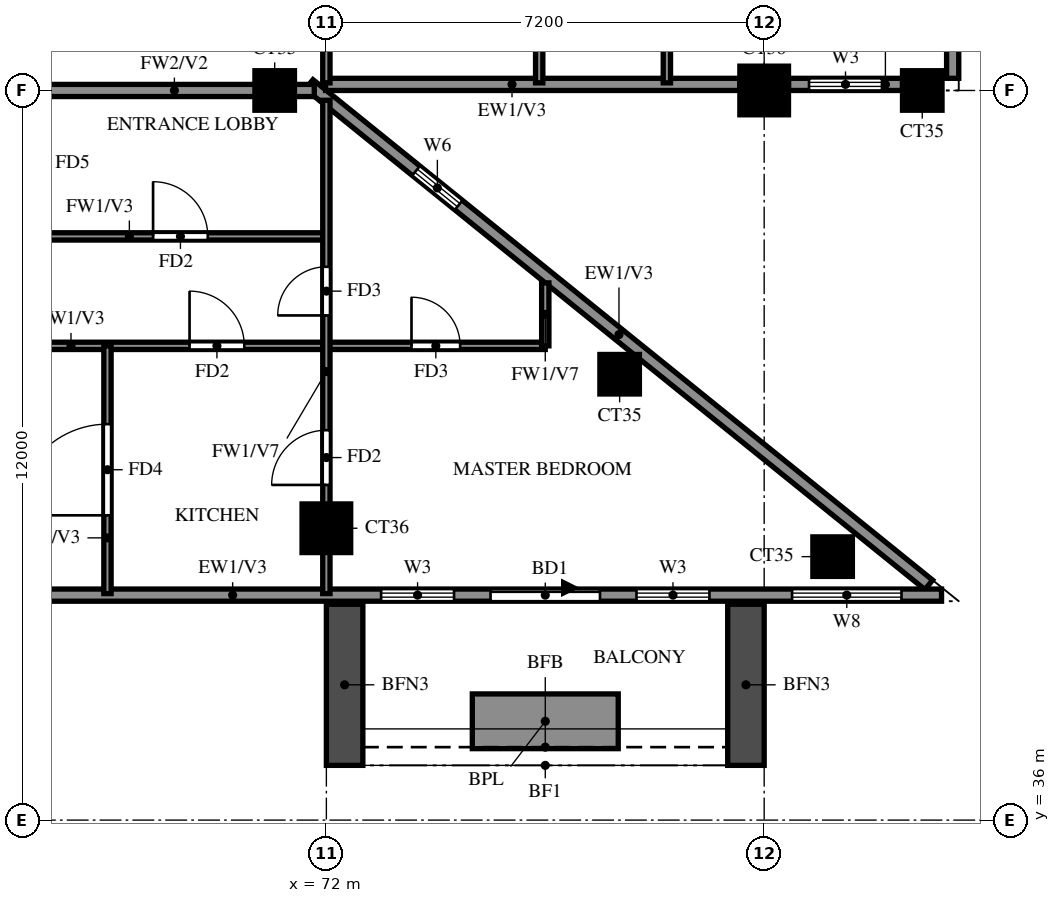
"""IFC4 building model, lengths in metres.
Left out: names, types, materials, properties, quantities, classifications, styles, units other than length and angle.
Written with IfcOpenShell. Run it as: python <this file> out.ifc"""

import sys

from ifc_helpers import new_model, si_unit, direction, frame, frame_2d, origin, origin_2d, place, context, subcontext, project, spatial, rectangle, extrude, source, transform, mapped, element, fill, save


model = new_model("IFC4")
c1 = context("Model", 3, precision=1e-05, world=origin(), true_north=direction((0.0, 1.0)))
c2 = subcontext(c1, "Body", "Model", "MODEL_VIEW")
j1 = project(units=[si_unit("LENGTHUNIT", "METRE"), si_unit("PLANEANGLEUNIT", "RADIAN")], contexts=[c1])
p1 = place(None, origin())
s1 = spatial("IfcSite", under=j1, at=p1, CompositionType="ELEMENT")
p2 = place(p1, origin())
s2 = spatial("IfcBuilding", under=s1, at=p2, CompositionType="ELEMENT")
p3 = place(p2, frame((0.0, 0.0, 243.0)))
s3 = spatial("IfcBuildingStorey", under=s2, at=p3, CompositionType="ELEMENT", Elevation=243.0)
m1 = source(origin(), c2, "Body", "SweptSolid", [
    extrude(rectangle(XDim=0.65, YDim=0.65, at=origin_2d()), origin(), (0.0, 0.0, 1.0), 3.22),
])
p4 = place(p3, frame((80.326, 40.333, 0.0), z_axis=(0.0, 0.0, 1.0), x_axis=(1.0, 0.0, 0.0)))
e1 = element("IfcColumn", 1, at=p4, inside=s3, PredefinedType="COLUMN", context=c2, shape_type="MappedRepresentation", body=[
    mapped(m1, transform((0.0, 0.0, 0.0))),
])
m2 = source(origin(), c2, "Body", "SweptSolid", [
    extrude(rectangle(XDim=0.8, YDim=0.8, at=origin_2d()), origin(), (0.0, 0.0, 1.0), 3.22),
])
p5 = place(p3, frame((72.0, 40.8, 0.0), z_axis=(0.0, 0.0, 1.0), x_axis=(1.0, 0.0, 0.0)))
e2 = element("IfcColumn", 2, at=p5, inside=s3, PredefinedType="COLUMN", context=c2, shape_type="MappedRepresentation", body=[
    mapped(m2, transform((0.0, 0.0, 0.0))),
])
for number, where, z_axis, x_axis in (
    (3, (76.823, 43.333, 0.0), (0.0, 0.0, 1.0), (1.0, 0.0, 0.0)),
    (4, (71.15, 48.0, 0.0), (0.0, 0.0, 1.0), (1.0, 0.0, 0.0)),
):
    element("IfcColumn", number, at=place(p3, frame(where, z_axis=z_axis, x_axis=x_axis)), inside=s3, PredefinedType="COLUMN", context=c2, shape_type="MappedRepresentation", body=[
        mapped(m1, transform((0.0, 0.0, 0.0))),
    ])
p6 = place(p3, frame((79.2, 48.0, 0.0), z_axis=(0.0, 0.0, 1.0), x_axis=(1.0, 0.0, 0.0)))
e5 = element("IfcColumn", 5, at=p6, inside=s3, PredefinedType="COLUMN", context=c2, shape_type="MappedRepresentation", body=[
    mapped(m2, transform((0.0, 0.0, 0.0))),
])
p7 = place(p3, frame((81.8, 48.0, 0.0), z_axis=(0.0, 0.0, 1.0), x_axis=(1.0, 0.0, 0.0)))
e6 = element("IfcColumn", 6, at=p7, inside=s3, PredefinedType="COLUMN", context=c2, shape_type="MappedRepresentation", body=[
    mapped(m1, transform((0.0, 0.0, 0.0))),
])
p8 = place(p3, frame((81.907, 39.87, 0.0), z_axis=(0.0, 0.0, 1.0), x_axis=(-0.777936274417, 0.62834318087, 0.0)))
e7 = element("IfcWall", 7, at=p8, inside=s3, PredefinedType="SOLIDWALL", context=c2, shape_type="SweptSolid", body=[
    extrude(rectangle(XDim=13.099, YDim=0.2, at=frame_2d((6.549, 0.0))), origin(), (0.0, 0.0, 1.0), 3.22),
])
p9 = place(p8, frame((9.938, 0.0, 1.5)))
e8 = element("IfcOpeningElement", 8, at=p9, cuts=e7, PredefinedType="OPENING", context=c2, shape_type="SweptSolid", body=[
    extrude(rectangle(XDim=0.9, YDim=0.9, at=frame_2d((0.45, 0.45))), frame((0.0, 0.11, 0.0), z_axis=(0.0, -1.0, 0.0), x_axis=(1.0, 0.0, 0.0)), (0.0, 0.0, 1.0), 0.22),
])
p10 = place(p3, frame((71.987, 48.1, 0.0), z_axis=(0.0, 0.0, 1.0), x_axis=(1.0, 0.0, 0.0)))
e9 = element("IfcWall", 9, at=p10, inside=s3, PredefinedType="SOLIDWALL", context=c2, shape_type="SweptSolid", body=[
    extrude(rectangle(XDim=6.813, YDim=0.2, at=frame_2d((3.406, 0.0))), origin(), (0.0, 0.0, 1.0), 3.22),
])
p11 = place(p3, frame((79.6, 48.1, 0.0), z_axis=(0.0, 0.0, 1.0), x_axis=(1.0, 0.0, 0.0)))
e10 = element("IfcWall", 10, at=p11, inside=s3, PredefinedType="SOLIDWALL", context=c2, shape_type="SweptSolid", body=[
    extrude(rectangle(XDim=1.875, YDim=0.2, at=frame_2d((0.938, 0.0))), origin(), (0.0, 0.0, 1.0), 3.22),
])
p12 = place(p11, frame((0.337, 0.0, 0.6)))
e11 = element("IfcOpeningElement", 11, at=p12, cuts=e10, PredefinedType="OPENING", context=c2, shape_type="SweptSolid", body=[
    extrude(rectangle(XDim=1.2, YDim=2.4, at=frame_2d((0.6, 1.2))), frame((0.0, 0.11, 0.0), z_axis=(0.0, -1.0, 0.0), x_axis=(1.0, 0.0, 0.0)), (0.0, 0.0, 1.0), 0.22),
])
p13 = place(p3, frame((82.3, 48.2, 0.0), z_axis=(0.0, 0.0, 1.0), x_axis=(0.0, 1.0, 0.0)))
e12 = element("IfcWall", 12, at=p13, inside=s3, PredefinedType="SOLIDWALL", context=c2, shape_type="SweptSolid", body=[
    extrude(rectangle(XDim=28.6, YDim=0.2, at=frame_2d((14.3, 0.0))), origin(), (0.0, 0.0, 1.0), 3.22),
])
p14 = place(p13, frame((11.5, 0.0, 0.0)))
e13 = element("IfcOpeningElement", 13, at=p14, cuts=e12, PredefinedType="OPENING", context=c2, shape_type="SweptSolid", body=[
    extrude(rectangle(XDim=1.8, YDim=2.4, at=frame_2d((0.9, 1.2))), frame((0.0, 0.11, 0.0), z_axis=(0.0, -1.0, 0.0), x_axis=(1.0, 0.0, 0.0)), (0.0, 0.0, 1.0), 0.22),
])
p15 = place(p13, frame((0.9, 0.0, 0.6)))
e14 = element("IfcOpeningElement", 14, at=p15, cuts=e12, PredefinedType="OPENING", context=c2, shape_type="SweptSolid", body=[
    extrude(rectangle(XDim=2.4, YDim=2.4, at=frame_2d((1.2, 1.2))), frame((0.0, 0.11, 0.0), z_axis=(0.0, -1.0, 0.0), x_axis=(1.0, 0.0, 0.0)), (0.0, 0.0, 1.0), 0.22),
])
p16 = place(p13, frame((3.9, 0.0, 0.6)))
e15 = element("IfcOpeningElement", 15, at=p16, cuts=e12, PredefinedType="OPENING", context=c2, shape_type="SweptSolid", body=[
    extrude(rectangle(XDim=2.4, YDim=2.4, at=frame_2d((1.2, 1.2))), frame((0.0, 0.11, 0.0), z_axis=(0.0, -1.0, 0.0), x_axis=(1.0, 0.0, 0.0)), (0.0, 0.0, 1.0), 0.22),
])
p17 = place(p13, frame((7.3, 0.0, 0.6)))
e16 = element("IfcOpeningElement", 16, at=p17, cuts=e12, PredefinedType="OPENING", context=c2, shape_type="SweptSolid", body=[
    extrude(rectangle(XDim=1.8, YDim=2.4, at=frame_2d((0.9, 1.2))), frame((0.0, 0.11, 0.0), z_axis=(0.0, -1.0, 0.0), x_axis=(1.0, 0.0, 0.0)), (0.0, 0.0, 1.0), 0.22),
])
p18 = place(p13, frame((14.5, 0.0, 0.6)))
e17 = element("IfcOpeningElement", 17, at=p18, cuts=e12, PredefinedType="OPENING", context=c2, shape_type="SweptSolid", body=[
    extrude(rectangle(XDim=1.2, YDim=2.4, at=frame_2d((0.6, 1.2))), frame((0.0, 0.11, 0.0), z_axis=(0.0, -1.0, 0.0), x_axis=(1.0, 0.0, 0.0)), (0.0, 0.0, 1.0), 0.22),
])
p19 = place(p13, frame((17.8, 0.0, 0.6)))
e18 = element("IfcOpeningElement", 18, at=p19, cuts=e12, PredefinedType="OPENING", context=c2, shape_type="SweptSolid", body=[
    extrude(rectangle(XDim=2.4, YDim=2.4, at=frame_2d((1.2, 1.2))), frame((0.0, 0.11, 0.0), z_axis=(0.0, -1.0, 0.0), x_axis=(1.0, 0.0, 0.0)), (0.0, 0.0, 1.0), 0.22),
])
p20 = place(p13, frame((22.75, 0.0, 1.5)))
e19 = element("IfcOpeningElement", 19, at=p20, cuts=e12, PredefinedType="OPENING", context=c2, shape_type="SweptSolid", body=[
    extrude(rectangle(XDim=0.9, YDim=0.9, at=frame_2d((0.45, 0.45))), frame((0.0, 0.11, 0.0), z_axis=(0.0, -1.0, 0.0), x_axis=(1.0, 0.0, 0.0)), (0.0, 0.0, 1.0), 0.22),
])
p21 = place(p13, frame((25.5, 0.0, 0.6)))
e20 = element("IfcOpeningElement", 20, at=p21, cuts=e12, PredefinedType="OPENING", context=c2, shape_type="SweptSolid", body=[
    extrude(rectangle(XDim=2.4, YDim=2.4, at=frame_2d((1.2, 1.2))), frame((0.0, 0.11, 0.0), z_axis=(0.0, -1.0, 0.0), x_axis=(1.0, 0.0, 0.0)), (0.0, 0.0, 1.0), 0.22),
])
p22 = place(p3, frame((58.8, 39.7, 0.0), z_axis=(0.0, 0.0, 1.0), x_axis=(1.0, 0.0, 0.0)))
e21 = element("IfcWall", 21, at=p22, inside=s3, PredefinedType="SOLIDWALL", context=c2, shape_type="SweptSolid", body=[
    extrude(rectangle(XDim=23.317, YDim=0.2, at=frame_2d((11.658, 0.0))), origin(), (0.0, 0.0, 1.0), 3.22),
])
p23 = place(p22, frame((15.9, 0.0, 0.0)))
e22 = element("IfcOpeningElement", 22, at=p23, cuts=e21, PredefinedType="OPENING", context=c2, shape_type="SweptSolid", body=[
    extrude(rectangle(XDim=1.8, YDim=2.4, at=frame_2d((0.9, 1.2))), frame((0.0, 0.11, 0.0), z_axis=(0.0, -1.0, 0.0), x_axis=(1.0, 0.0, 0.0)), (0.0, 0.0, 1.0), 0.22),
])
p24 = place(p22, frame((2.433, 0.0, 0.6)))
e23 = element("IfcOpeningElement", 23, at=p24, cuts=e21, PredefinedType="OPENING", context=c2, shape_type="SweptSolid", body=[
    extrude(rectangle(XDim=2.4, YDim=2.4, at=frame_2d((1.2, 1.2))), frame((0.0, 0.11, 0.0), z_axis=(0.0, -1.0, 0.0), x_axis=(1.0, 0.0, 0.0)), (0.0, 0.0, 1.0), 0.22),
])
p25 = place(p22, frame((5.967, 0.0, 0.6)))
e24 = element("IfcOpeningElement", 24, at=p25, cuts=e21, PredefinedType="OPENING", context=c2, shape_type="SweptSolid", body=[
    extrude(rectangle(XDim=2.4, YDim=2.4, at=frame_2d((1.2, 1.2))), frame((0.0, 0.11, 0.0), z_axis=(0.0, -1.0, 0.0), x_axis=(1.0, 0.0, 0.0)), (0.0, 0.0, 1.0), 0.22),
])
p26 = place(p22, frame((14.1, 0.0, 0.6)))
e25 = element("IfcOpeningElement", 25, at=p26, cuts=e21, PredefinedType="OPENING", context=c2, shape_type="SweptSolid", body=[
    extrude(rectangle(XDim=1.2, YDim=2.4, at=frame_2d((0.6, 1.2))), frame((0.0, 0.11, 0.0), z_axis=(0.0, -1.0, 0.0), x_axis=(1.0, 0.0, 0.0)), (0.0, 0.0, 1.0), 0.22),
])
p27 = place(p22, frame((18.3, 0.0, 0.6)))
e26 = element("IfcOpeningElement", 26, at=p27, cuts=e21, PredefinedType="OPENING", context=c2, shape_type="SweptSolid", body=[
    extrude(rectangle(XDim=1.2, YDim=2.4, at=frame_2d((0.6, 1.2))), frame((0.0, 0.11, 0.0), z_axis=(0.0, -1.0, 0.0), x_axis=(1.0, 0.0, 0.0)), (0.0, 0.0, 1.0), 0.22),
])
p28 = place(p22, frame((20.858, 0.0, 0.6)))
e27 = element("IfcOpeningElement", 27, at=p28, cuts=e21, PredefinedType="OPENING", context=c2, shape_type="SweptSolid", body=[
    extrude(rectangle(XDim=1.8, YDim=2.4, at=frame_2d((0.9, 1.2))), frame((0.0, 0.11, 0.0), z_axis=(0.0, -1.0, 0.0), x_axis=(1.0, 0.0, 0.0)), (0.0, 0.0, 1.0), 0.22),
])
for number, where, z_axis, x_axis in (
    (28, (72.3, 39.55, 0.0), (0.0, 0.0, 1.0), (0.0, -1.0, 0.0)),
    (29, (78.9, 39.55, 0.0), (0.0, 0.0, 1.0), (0.0, -1.0, 0.0)),
):
    element("IfcWall", number, at=place(p3, frame(where, z_axis=z_axis, x_axis=x_axis)), inside=s3, PredefinedType="SOLIDWALL", context=c2, shape_type="SweptSolid", body=[
        extrude(rectangle(XDim=2.65, YDim=0.6, at=frame_2d((1.325, 0.0))), origin(), (0.0, 0.0, 1.0), 2.85),
    ])
p29 = place(p3, frame((74.4, 37.625, 0.0), z_axis=(0.0, 0.0, 1.0), x_axis=(1.0, 0.0, 0.0)))
e30 = element("IfcWall", 30, at=p29, inside=s3, PredefinedType="SOLIDWALL", context=c2, shape_type="SweptSolid", body=[
    extrude(rectangle(XDim=2.4, YDim=0.9, at=frame_2d((1.2, 0.0))), origin(), (0.0, 0.0, 1.0), 0.9),
])
p30 = place(p3, frame((67.2, 48.0, 0.0), z_axis=(0.0, 0.0, 1.0), x_axis=(1.0, 0.0, 0.0)))
e31 = element("IfcWall", 31, at=p30, inside=s3, PredefinedType="SOLIDWALL", context=c2, shape_type="SweptSolid", body=[
    extrude(rectangle(XDim=4.601, YDim=0.2, at=frame_2d((2.301, 0.0))), origin(), (0.0, 0.0, 1.0), 3.22),
])
p31 = place(p3, frame((60.0, 43.8, 0.0), z_axis=(0.0, 0.0, 1.0), x_axis=(1.0, 0.0, 0.0)))
e32 = element("IfcWall", 32, at=p31, inside=s3, PredefinedType="PARTITIONING", context=c2, shape_type="SweptSolid", body=[
    extrude(rectangle(XDim=15.6, YDim=0.12, at=frame_2d((7.8, 0.0))), origin(), (0.0, 0.0, 1.0), 3.22),
])
p32 = place(p31, frame((9.75, 0.0, 0.0)))
e33 = element("IfcOpeningElement", 33, at=p32, cuts=e32, PredefinedType="OPENING", context=c2, shape_type="SweptSolid", body=[
    extrude(rectangle(XDim=0.9, YDim=2.1, at=frame_2d((0.45, 1.05))), frame((0.0, 0.07, 0.0), z_axis=(0.0, -1.0, 0.0), x_axis=(1.0, 0.0, 0.0)), (0.0, 0.0, 1.0), 0.14),
])
p33 = place(p31, frame((3.45, 0.0, 0.0)))
e34 = element("IfcOpeningElement", 34, at=p33, cuts=e32, PredefinedType="OPENING", context=c2, shape_type="SweptSolid", body=[
    extrude(rectangle(XDim=1.5, YDim=2.1, at=frame_2d((0.75, 1.05))), frame((0.0, 0.07, 0.0), z_axis=(0.0, -1.0, 0.0), x_axis=(1.0, 0.0, 0.0)), (0.0, 0.0, 1.0), 0.14),
])
p34 = place(p31, frame((13.4, 0.0, 0.0)))
e35 = element("IfcOpeningElement", 35, at=p34, cuts=e32, PredefinedType="OPENING", context=c2, shape_type="SweptSolid", body=[
    extrude(rectangle(XDim=0.8, YDim=2.1, at=frame_2d((0.4, 1.05))), frame((0.0, 0.07, 0.0), z_axis=(0.0, -1.0, 0.0), x_axis=(1.0, 0.0, 0.0)), (0.0, 0.0, 1.0), 0.14),
])
p35 = place(p3, frame((67.2, 45.6, 0.0), z_axis=(0.0, 0.0, 1.0), x_axis=(1.0, 0.0, 0.0)))
e36 = element("IfcWall", 36, at=p35, inside=s3, PredefinedType="PARTITIONING", context=c2, shape_type="SweptSolid", body=[
    extrude(rectangle(XDim=4.8, YDim=0.12, at=frame_2d((2.4, 0.0))), origin(), (0.0, 0.0, 1.0), 3.22),
])
p36 = place(p35, frame((1.95, 0.0, 0.0)))
e37 = element("IfcOpeningElement", 37, at=p36, cuts=e36, PredefinedType="OPENING", context=c2, shape_type="SweptSolid", body=[
    extrude(rectangle(XDim=0.9, YDim=2.1, at=frame_2d((0.45, 1.05))), frame((0.0, 0.07, 0.0), z_axis=(0.0, -1.0, 0.0), x_axis=(1.0, 0.0, 0.0)), (0.0, 0.0, 1.0), 0.14),
])
p37 = place(p3, frame((68.4, 39.725, 0.0), z_axis=(0.0, 0.0, 1.0), x_axis=(0.0, 1.0, 0.0)))
e38 = element("IfcWall", 38, at=p37, inside=s3, PredefinedType="PARTITIONING", context=c2, shape_type="SweptSolid", body=[
    extrude(rectangle(XDim=4.075, YDim=0.12, at=frame_2d((2.038, 0.0))), origin(), (0.0, 0.0, 1.0), 3.22),
])
p38 = place(p37, frame((1.288, 0.0, 0.0)))
e39 = element("IfcOpeningElement", 39, at=p38, cuts=e38, PredefinedType="OPENING", context=c2, shape_type="SweptSolid", body=[
    extrude(rectangle(XDim=1.5, YDim=2.1, at=frame_2d((0.75, 1.05))), frame((0.0, 0.07, 0.0), z_axis=(0.0, -1.0, 0.0), x_axis=(1.0, 0.0, 0.0)), (0.0, 0.0, 1.0), 0.14),
])
p39 = place(p3, frame((72.0, 39.725, 0.0), z_axis=(0.0, 0.0, 1.0), x_axis=(0.0, 1.0, 0.0)))
e40 = element("IfcWall", 40, at=p39, inside=s3, PredefinedType="PARTITIONING", context=c2, shape_type="SweptSolid", body=[
    extrude(rectangle(XDim=8.114, YDim=0.12, at=frame_2d((4.057, 0.0))), origin(), (0.0, 0.0, 1.0), 2.32),
])
p40 = place(p39, frame((1.788, 0.0, 0.0)))
e41 = element("IfcOpeningElement", 41, at=p40, cuts=e40, PredefinedType="OPENING", context=c2, shape_type="SweptSolid", body=[
    extrude(rectangle(XDim=0.9, YDim=2.1, at=frame_2d((0.45, 1.05))), frame((0.0, 0.07, 0.0), z_axis=(0.0, -1.0, 0.0), x_axis=(1.0, 0.0, 0.0)), (0.0, 0.0, 1.0), 0.14),
])
p41 = place(p39, frame((4.575, 0.0, 0.0)))
e42 = element("IfcOpeningElement", 42, at=p41, cuts=e40, PredefinedType="OPENING", context=c2, shape_type="SweptSolid", body=[
    extrude(rectangle(XDim=0.8, YDim=2.1, at=frame_2d((0.4, 1.05))), frame((0.0, 0.07, 0.0), z_axis=(0.0, -1.0, 0.0), x_axis=(1.0, 0.0, 0.0)), (0.0, 0.0, 1.0), 0.14),
])
for number, where, z_axis, x_axis in (
    (43, (72.0, 48.125, 0.0), (0.0, 0.0, 1.0), (0.0, 1.0, 0.0)),
    (44, (75.5, 48.125, 0.0), (0.0, 0.0, 1.0), (0.0, 1.0, 0.0)),
):
    element("IfcWall", number, at=place(p3, frame(where, z_axis=z_axis, x_axis=x_axis)), inside=s3, PredefinedType="PARTITIONING", context=c2, shape_type="SweptSolid", body=[
        extrude(rectangle(XDim=3.475, YDim=0.12, at=frame_2d((1.738, 0.0))), origin(), (0.0, 0.0, 1.0), 3.22),
    ])
p42 = place(p3, frame((75.6, 43.8, 0.0), z_axis=(0.0, 0.0, 1.0), x_axis=(0.0, 1.0, 0.0)))
e45 = element("IfcWall", 45, at=p42, inside=s3, PredefinedType="PARTITIONING", context=c2, shape_type="SweptSolid", body=[
    extrude(rectangle(XDim=1.035, YDim=0.12, at=frame_2d((0.518, 0.0))), origin(), (0.0, 0.0, 1.0), 2.32),
])
p43 = place(p3, frame((77.6, 48.125, 0.0), z_axis=(0.0, 0.0, 1.0), x_axis=(0.0, 1.0, 0.0)))
e46 = element("IfcWall", 46, at=p43, inside=s3, PredefinedType="PARTITIONING", context=c2, shape_type="SweptSolid", body=[
    extrude(rectangle(XDim=21.475, YDim=0.12, at=frame_2d((10.738, 0.0))), origin(), (0.0, 0.0, 1.0), 3.22),
])
p44 = place(p43, frame((2.788, 0.0, 0.0)))
e47 = element("IfcOpeningElement", 47, at=p44, cuts=e46, PredefinedType="OPENING", context=c2, shape_type="SweptSolid", body=[
    extrude(rectangle(XDim=1.5, YDim=2.1, at=frame_2d((0.75, 1.05))), frame((0.0, 0.07, 0.0), z_axis=(0.0, -1.0, 0.0), x_axis=(1.0, 0.0, 0.0)), (0.0, 0.0, 1.0), 0.14),
])
p45 = place(p43, frame((8.425, 0.0, 0.0)))
e48 = element("IfcOpeningElement", 48, at=p45, cuts=e46, PredefinedType="OPENING", context=c2, shape_type="SweptSolid", body=[
    extrude(rectangle(XDim=0.9, YDim=2.1, at=frame_2d((0.45, 1.05))), frame((0.0, 0.07, 0.0), z_axis=(0.0, -1.0, 0.0), x_axis=(1.0, 0.0, 0.0)), (0.0, 0.0, 1.0), 0.14),
])
p46 = place(p43, frame((12.025, 0.0, 0.0)))
e49 = element("IfcOpeningElement", 49, at=p46, cuts=e46, PredefinedType="OPENING", context=c2, shape_type="SweptSolid", body=[
    extrude(rectangle(XDim=0.9, YDim=2.1, at=frame_2d((0.45, 1.05))), frame((0.0, 0.07, 0.0), z_axis=(0.0, -1.0, 0.0), x_axis=(1.0, 0.0, 0.0)), (0.0, 0.0, 1.0), 0.14),
])
p47 = place(p43, frame((17.425, 0.0, 0.0)))
e50 = element("IfcOpeningElement", 50, at=p47, cuts=e46, PredefinedType="OPENING", context=c2, shape_type="SweptSolid", body=[
    extrude(rectangle(XDim=0.9, YDim=2.1, at=frame_2d((0.45, 1.05))), frame((0.0, 0.07, 0.0), z_axis=(0.0, -1.0, 0.0), x_axis=(1.0, 0.0, 0.0)), (0.0, 0.0, 1.0), 0.14),
])
p48 = place(p9, origin())
e51 = element("IfcWindow", 51, at=p48, inside=s3, PartitioningType="SINGLE_PANEL", PredefinedType="WINDOW", context=c2, shape_type="SweptSolid", body=[
    extrude(rectangle(XDim=0.9, YDim=0.9, at=frame_2d((0.45, 0.45))), frame((0.0, 0.03, 0.0), z_axis=(0.0, -1.0, 0.0), x_axis=(1.0, 0.0, 0.0)), (0.0, 0.0, 1.0), 0.06),
])
fill(e8, e51)
p49 = place(p12, origin())
e52 = element("IfcWindow", 52, at=p49, inside=s3, PartitioningType="SINGLE_PANEL", PredefinedType="WINDOW", context=c2, shape_type="SweptSolid", body=[
    extrude(rectangle(XDim=1.2, YDim=2.4, at=frame_2d((0.6, 1.2))), frame((0.0, 0.03, 0.0), z_axis=(0.0, -1.0, 0.0), x_axis=(1.0, 0.0, 0.0)), (0.0, 0.0, 1.0), 0.06),
])
fill(e11, e52)
p50 = place(p23, origin())
e53 = element("IfcDoor", 53, at=p50, inside=s3, OperationType="DOUBLE_DOOR_SLIDING", PredefinedType="DOOR", context=c2, shape_type="SweptSolid", body=[
    extrude(rectangle(XDim=1.8, YDim=2.4, at=frame_2d((0.9, 1.2))), frame((0.0, 0.025, 0.0), z_axis=(0.0, -1.0, 0.0), x_axis=(1.0, 0.0, 0.0)), (0.0, 0.0, 1.0), 0.05),
])
fill(e22, e53)
p51 = place(p26, origin())
e54 = element("IfcWindow", 54, at=p51, inside=s3, PartitioningType="SINGLE_PANEL", PredefinedType="WINDOW", context=c2, shape_type="SweptSolid", body=[
    extrude(rectangle(XDim=1.2, YDim=2.4, at=frame_2d((0.6, 1.2))), frame((0.0, 0.03, 0.0), z_axis=(0.0, -1.0, 0.0), x_axis=(1.0, 0.0, 0.0)), (0.0, 0.0, 1.0), 0.06),
])
fill(e25, e54)
p52 = place(p27, origin())
e55 = element("IfcWindow", 55, at=p52, inside=s3, PartitioningType="SINGLE_PANEL", PredefinedType="WINDOW", context=c2, shape_type="SweptSolid", body=[
    extrude(rectangle(XDim=1.2, YDim=2.4, at=frame_2d((0.6, 1.2))), frame((0.0, 0.03, 0.0), z_axis=(0.0, -1.0, 0.0), x_axis=(1.0, 0.0, 0.0)), (0.0, 0.0, 1.0), 0.06),
])
fill(e26, e55)
p53 = place(p28, origin())
e56 = element("IfcWindow", 56, at=p53, inside=s3, PartitioningType="DOUBLE_PANEL_VERTICAL", PredefinedType="WINDOW", context=c2, shape_type="SweptSolid", body=[
    extrude(rectangle(XDim=1.8, YDim=2.4, at=frame_2d((0.9, 1.2))), frame((0.0, 0.03, 0.0), z_axis=(0.0, -1.0, 0.0), x_axis=(1.0, 0.0, 0.0)), (0.0, 0.0, 1.0), 0.06),
])
fill(e27, e56)
p54 = place(p38, origin())
e57 = element("IfcDoor", 57, at=p54, inside=s3, OperationType="SINGLE_SWING_LEFT", PredefinedType="DOOR", context=c2, shape_type="SweptSolid", body=[
    extrude(rectangle(XDim=1.5, YDim=2.1, at=frame_2d((0.75, 1.05))), frame((0.0, 0.025, 0.0), z_axis=(0.0, -1.0, 0.0), x_axis=(1.0, 0.0, 0.0)), (0.0, 0.0, 1.0), 0.05),
])
fill(e39, e57)
p55 = place(p36, origin())
e58 = element("IfcDoor", 58, at=p55, inside=s3, OperationType="SINGLE_SWING_RIGHT", PredefinedType="DOOR", context=c2, shape_type="SweptSolid", body=[
    extrude(rectangle(XDim=0.9, YDim=2.1, at=frame_2d((0.45, 1.05))), frame((0.0, 0.025, 0.0), z_axis=(0.0, -1.0, 0.0), x_axis=(1.0, 0.0, 0.0)), (0.0, 0.0, 1.0), 0.05),
])
fill(e37, e58)
p56 = place(p32, origin())
e59 = element("IfcDoor", 59, at=p56, inside=s3, OperationType="SINGLE_SWING_LEFT", PredefinedType="DOOR", context=c2, shape_type="SweptSolid", body=[
    extrude(rectangle(XDim=0.9, YDim=2.1, at=frame_2d((0.45, 1.05))), frame((0.0, 0.025, 0.0), z_axis=(0.0, -1.0, 0.0), x_axis=(1.0, 0.0, 0.0)), (0.0, 0.0, 1.0), 0.05),
])
fill(e33, e59)
p57 = place(p40, origin())
e60 = element("IfcDoor", 60, at=p57, inside=s3, OperationType="SINGLE_SWING_RIGHT", PredefinedType="DOOR", context=c2, shape_type="SweptSolid", body=[
    extrude(rectangle(XDim=0.9, YDim=2.1, at=frame_2d((0.45, 1.05))), frame((0.0, 0.025, 0.0), z_axis=(0.0, -1.0, 0.0), x_axis=(1.0, 0.0, 0.0)), (0.0, 0.0, 1.0), 0.05),
])
fill(e41, e60)
p58 = place(p41, origin())
e61 = element("IfcDoor", 61, at=p58, inside=s3, OperationType="SINGLE_SWING_LEFT", PredefinedType="DOOR", context=c2, shape_type="SweptSolid", body=[
    extrude(rectangle(XDim=0.8, YDim=2.1, at=frame_2d((0.4, 1.05))), frame((0.0, 0.025, 0.0), z_axis=(0.0, -1.0, 0.0), x_axis=(1.0, 0.0, 0.0)), (0.0, 0.0, 1.0), 0.05),
])
fill(e42, e61)
p59 = place(p34, origin())
e62 = element("IfcDoor", 62, at=p59, inside=s3, OperationType="SINGLE_SWING_RIGHT", PredefinedType="DOOR", context=c2, shape_type="SweptSolid", body=[
    extrude(rectangle(XDim=0.8, YDim=2.1, at=frame_2d((0.4, 1.05))), frame((0.0, 0.025, 0.0), z_axis=(0.0, -1.0, 0.0), x_axis=(1.0, 0.0, 0.0)), (0.0, 0.0, 1.0), 0.05),
])
fill(e35, e62)
save(model, sys.argv[1])
